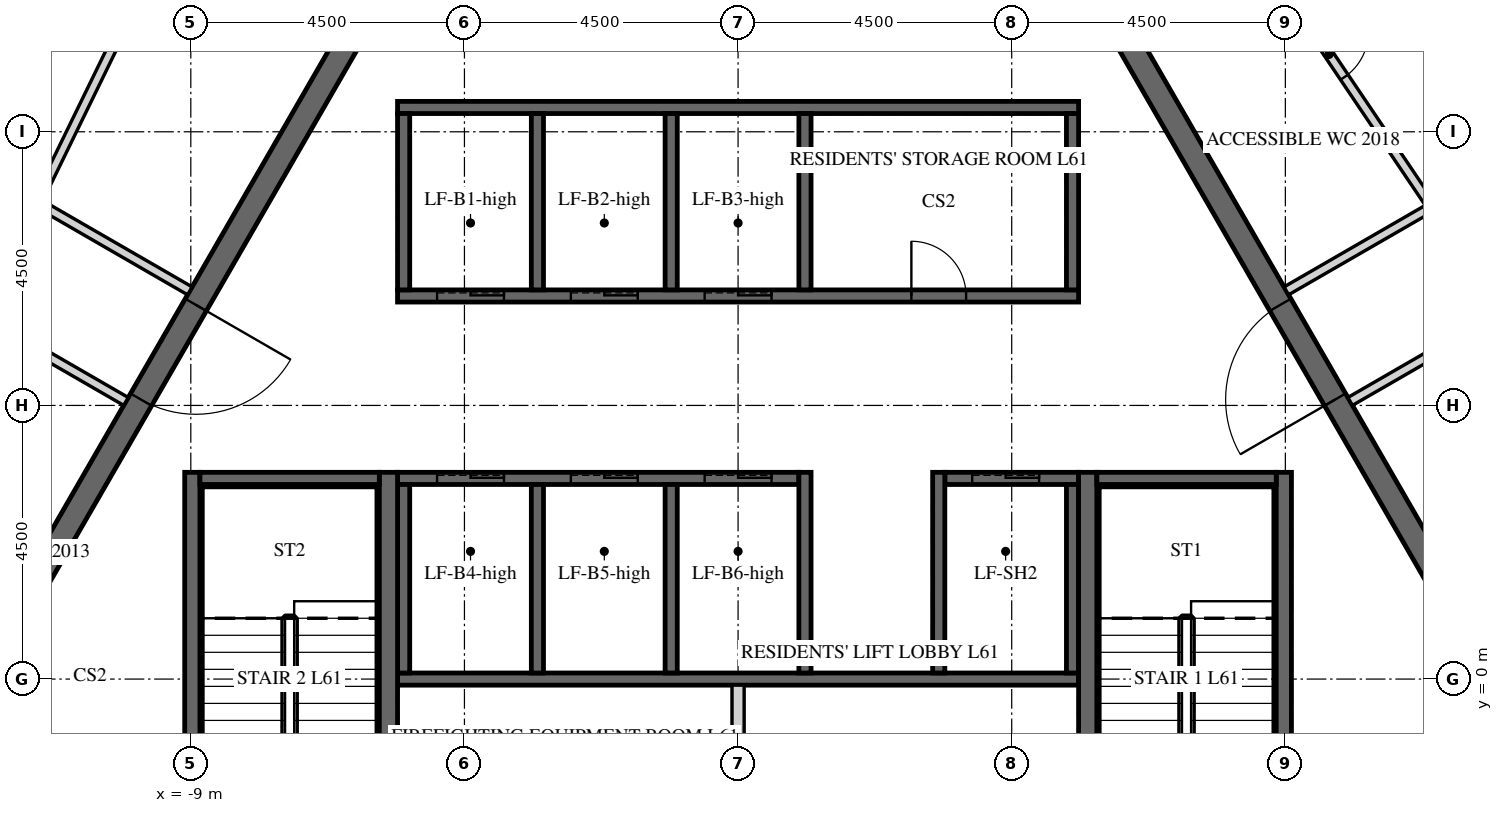
"""IFC4 building model, lengths in metres.
Left out: names, types, materials, properties, quantities, classifications, styles, units other than length and angle.
Written with IfcOpenShell. Run it as: python <this file> out.ifc"""

import sys

from ifc_helpers import new_model, si_unit, direction, frame, frame_2d, origin, place, context, subcontext, project, spatial, polyline, rectangle, outline, extrude, element, fill, save


model = new_model("IFC4")
c1 = context("Model", 3, precision=1e-05, world=origin(), true_north=direction((0.0, 1.0)))
c2 = subcontext(c1, "Body", "Model", "MODEL_VIEW")
j1 = project(units=[si_unit("LENGTHUNIT", "METRE"), si_unit("PLANEANGLEUNIT", "RADIAN")], contexts=[c1])
p1 = place(None, origin())
s1 = spatial("IfcSite", under=j1, at=p1, CompositionType="ELEMENT")
p2 = place(p1, origin())
s2 = spatial("IfcBuilding", under=s1, at=p2, CompositionType="ELEMENT")
p3 = place(p2, frame((0.0, 0.0, 256.2)))
s3 = spatial("IfcBuildingStorey", under=s2, at=p3, CompositionType="ELEMENT", Elevation=256.2)
p4 = place(p3, frame((-6.235, 10.8, 0.0), z_axis=(0.0, 0.0, 1.0), x_axis=(-0.499996419489, -0.866027470984, 0.0)))
e1 = element("IfcWall", 1, at=p4, inside=s3, PredefinedType="SHEAR", context=c2, shape_type="SweptSolid", body=[
    extrude(outline(polyline([(-0.115, -0.2), (12.586, -0.2), (12.355, 0.2), (0.115, 0.2), (-0.115, -0.2)])), origin(), (0.0, 0.0, 1.0), 3.75),
])
p5 = place(p4, frame((5.364, 0.0, 0.0)))
e2 = element("IfcOpeningElement", 2, at=p5, cuts=e1, PredefinedType="OPENING", context=c2, shape_type="SweptSolid", body=[
    extrude(rectangle(XDim=1.8, YDim=2.4, at=frame_2d((0.9, 1.2))), frame((0.0, 0.21, 0.0), z_axis=(0.0, -1.0, 0.0), x_axis=(1.0, 0.0, 0.0)), (0.0, 0.0, 1.0), 0.42),
])
p6 = place(p3, frame((-12.471, 0.0, 0.0), z_axis=(0.0, 0.0, 1.0), x_axis=(0.499996419489, -0.866027470984, 0.0)))
e3 = element("IfcWall", 3, at=p6, inside=s3, PredefinedType="SHEAR", context=c2, shape_type="SweptSolid", body=[
    extrude(outline(polyline([(-0.115, -0.2), (12.586, -0.2), (12.355, 0.2), (0.115, 0.2), (-0.115, -0.2)])), origin(), (0.0, 0.0, 1.0), 3.75),
])
p7 = place(p6, frame((5.306, 0.0, 0.0)))
e4 = element("IfcOpeningElement", 4, at=p7, cuts=e3, PredefinedType="OPENING", context=c2, shape_type="SweptSolid", body=[
    extrude(rectangle(XDim=1.8, YDim=2.4, at=frame_2d((0.9, 1.2))), frame((0.0, 0.21, 0.0), z_axis=(0.0, -1.0, 0.0), x_axis=(1.0, 0.0, 0.0)), (0.0, 0.0, 1.0), 0.42),
])
p8 = place(p3, frame((6.235, -10.8, 0.0), z_axis=(0.0, 0.0, 1.0), x_axis=(0.499996419489, 0.866027470984, 0.0)))
e5 = element("IfcWall", 5, at=p8, inside=s3, PredefinedType="SHEAR", context=c2, shape_type="SweptSolid", body=[
    extrude(outline(polyline([(-0.115, -0.2), (12.586, -0.2), (12.355, 0.2), (0.115, 0.2), (-0.115, -0.2)])), origin(), (0.0, 0.0, 1.0), 3.75),
])
p9 = place(p8, frame((5.364, 0.0, 0.0)))
e6 = element("IfcOpeningElement", 6, at=p9, cuts=e5, PredefinedType="OPENING", context=c2, shape_type="SweptSolid", body=[
    extrude(rectangle(XDim=1.8, YDim=2.4, at=frame_2d((0.9, 1.2))), frame((0.0, 0.21, 0.0), z_axis=(0.0, -1.0, 0.0), x_axis=(1.0, 0.0, 0.0)), (0.0, 0.0, 1.0), 0.42),
])
p10 = place(p3, frame((12.471, 0.0, 0.0), z_axis=(0.0, 0.0, 1.0), x_axis=(-0.499996419489, 0.866027470984, 0.0)))
e7 = element("IfcWall", 7, at=p10, inside=s3, PredefinedType="SHEAR", context=c2, shape_type="SweptSolid", body=[
    extrude(outline(polyline([(-0.115, -0.2), (12.586, -0.2), (12.355, 0.2), (0.115, 0.2), (-0.115, -0.2)])), origin(), (0.0, 0.0, 1.0), 3.75),
])
p11 = place(p10, frame((5.306, 0.0, 0.0)))
e8 = element("IfcOpeningElement", 8, at=p11, cuts=e7, PredefinedType="OPENING", context=c2, shape_type="SweptSolid", body=[
    extrude(rectangle(XDim=1.8, YDim=2.4, at=frame_2d((0.9, 1.2))), frame((0.0, 0.21, 0.0), z_axis=(0.0, -1.0, 0.0), x_axis=(1.0, 0.0, 0.0)), (0.0, 0.0, 1.0), 0.42),
])
p12 = place(p3, frame((-5.6, 6.3, -0.5), z_axis=(0.0, 0.0, 1.0), x_axis=(1.0, 0.0, 0.0)))
e9 = element("IfcWall", 9, at=p12, inside=s3, PredefinedType="SHEAR", context=c2, shape_type="SweptSolid", body=[
    extrude(rectangle(XDim=11.2, YDim=0.2, at=frame_2d((5.6, 0.0))), origin(), (0.0, 0.0, 1.0), 4.15),
])
p13 = place(p12, frame((8.45, 0.0, 0.5)))
e10 = element("IfcOpeningElement", 10, at=p13, cuts=e9, PredefinedType="OPENING", context=c2, shape_type="SweptSolid", body=[
    extrude(rectangle(XDim=0.9, YDim=2.1, at=frame_2d((0.45, 1.05))), frame((0.0, 0.11, 0.0), z_axis=(0.0, -1.0, 0.0), x_axis=(1.0, 0.0, 0.0)), (0.0, 0.0, 1.0), 0.22),
])
p14 = place(p12, frame((0.65, 0.0, 0.5)))
e11 = element("IfcOpeningElement", 11, at=p14, cuts=e9, PredefinedType="OPENING", context=c2, shape_type="SweptSolid", body=[
    extrude(rectangle(XDim=1.1, YDim=2.1, at=frame_2d((0.55, 1.05))), frame((0.0, 0.11, 0.0), z_axis=(0.0, -1.0, 0.0), x_axis=(1.0, 0.0, 0.0)), (0.0, 0.0, 1.0), 0.22),
])
p15 = place(p12, frame((2.85, 0.0, 0.5)))
e12 = element("IfcOpeningElement", 12, at=p15, cuts=e9, PredefinedType="OPENING", context=c2, shape_type="SweptSolid", body=[
    extrude(rectangle(XDim=1.1, YDim=2.1, at=frame_2d((0.55, 1.05))), frame((0.0, 0.11, 0.0), z_axis=(0.0, -1.0, 0.0), x_axis=(1.0, 0.0, 0.0)), (0.0, 0.0, 1.0), 0.22),
])
p16 = place(p12, frame((5.05, 0.0, 0.5)))
e13 = element("IfcOpeningElement", 13, at=p16, cuts=e9, PredefinedType="OPENING", context=c2, shape_type="SweptSolid", body=[
    extrude(rectangle(XDim=1.1, YDim=2.1, at=frame_2d((0.55, 1.05))), frame((0.0, 0.11, 0.0), z_axis=(0.0, -1.0, 0.0), x_axis=(1.0, 0.0, 0.0)), (0.0, 0.0, 1.0), 0.22),
])
p17 = place(p3, frame((-5.6, 9.4, -0.5), z_axis=(0.0, 0.0, 1.0), x_axis=(1.0, 0.0, 0.0)))
e14 = element("IfcWall", 14, at=p17, inside=s3, PredefinedType="SHEAR", context=c2, shape_type="SweptSolid", body=[
    extrude(rectangle(XDim=11.2, YDim=0.2, at=frame_2d((5.6, 0.0))), origin(), (0.0, 0.0, 1.0), 4.15),
])
for number, where, z_axis, x_axis in (
    (15, (-5.5, 6.4, -0.5), (0.0, 0.0, 1.0), (0.0, 1.0, 0.0)),
    (16, (-3.3, 6.4, -0.5), (0.0, 0.0, 1.0), (0.0, 1.0, 0.0)),
    (17, (-1.1, 6.4, -0.5), (0.0, 0.0, 1.0), (0.0, 1.0, 0.0)),
    (18, (1.1, 6.4, -0.5), (0.0, 0.0, 1.0), (0.0, 1.0, 0.0)),
    (19, (5.5, 6.4, -0.5), (0.0, 0.0, 1.0), (0.0, 1.0, 0.0)),
):
    element("IfcWall", number, at=place(p3, frame(where, z_axis=z_axis, x_axis=x_axis)), inside=s3, PredefinedType="SHEAR", context=c2, shape_type="SweptSolid", body=[
        extrude(rectangle(XDim=2.9, YDim=0.2, at=frame_2d((1.45, 0.0))), origin(), (0.0, 0.0, 1.0), 4.15),
    ])
p18 = place(p3, frame((-5.6, 3.3, -0.5), z_axis=(0.0, 0.0, 1.0), x_axis=(1.0, 0.0, 0.0)))
e20 = element("IfcWall", 20, at=p18, inside=s3, PredefinedType="SHEAR", context=c2, shape_type="SweptSolid", body=[
    extrude(rectangle(XDim=6.6, YDim=0.2, at=frame_2d((3.3, 0.0))), origin(), (0.0, 0.0, 1.0), 4.15),
])
p19 = place(p18, frame((0.65, 0.0, 0.5)))
e21 = element("IfcOpeningElement", 21, at=p19, cuts=e20, PredefinedType="OPENING", context=c2, shape_type="SweptSolid", body=[
    extrude(rectangle(XDim=1.1, YDim=2.1, at=frame_2d((0.55, 1.05))), frame((0.0, 0.11, 0.0), z_axis=(0.0, -1.0, 0.0), x_axis=(1.0, 0.0, 0.0)), (0.0, 0.0, 1.0), 0.22),
])
p20 = place(p18, frame((2.85, 0.0, 0.5)))
e22 = element("IfcOpeningElement", 22, at=p20, cuts=e20, PredefinedType="OPENING", context=c2, shape_type="SweptSolid", body=[
    extrude(rectangle(XDim=1.1, YDim=2.1, at=frame_2d((0.55, 1.05))), frame((0.0, 0.11, 0.0), z_axis=(0.0, -1.0, 0.0), x_axis=(1.0, 0.0, 0.0)), (0.0, 0.0, 1.0), 0.22),
])
p21 = place(p18, frame((5.05, 0.0, 0.5)))
e23 = element("IfcOpeningElement", 23, at=p21, cuts=e20, PredefinedType="OPENING", context=c2, shape_type="SweptSolid", body=[
    extrude(rectangle(XDim=1.1, YDim=2.1, at=frame_2d((0.55, 1.05))), frame((0.0, 0.11, 0.0), z_axis=(0.0, -1.0, 0.0), x_axis=(1.0, 0.0, 0.0)), (0.0, 0.0, 1.0), 0.22),
])
p22 = place(p3, frame((3.4, 3.3, -0.5), z_axis=(0.0, 0.0, 1.0), x_axis=(1.0, 0.0, 0.0)))
e24 = element("IfcWall", 24, at=p22, inside=s3, PredefinedType="SHEAR", context=c2, shape_type="SweptSolid", body=[
    extrude(rectangle(XDim=2.2, YDim=0.2, at=frame_2d((1.1, 0.0))), origin(), (0.0, 0.0, 1.0), 4.15),
])
p23 = place(p22, frame((0.45, 0.0, 0.5)))
e25 = element("IfcOpeningElement", 25, at=p23, cuts=e24, PredefinedType="OPENING", context=c2, shape_type="SweptSolid", body=[
    extrude(rectangle(XDim=1.1, YDim=2.1, at=frame_2d((0.55, 1.05))), frame((0.0, 0.11, 0.0), z_axis=(0.0, -1.0, 0.0), x_axis=(1.0, 0.0, 0.0)), (0.0, 0.0, 1.0), 0.22),
])
p24 = place(p3, frame((-5.6, 0.0, -0.5), z_axis=(0.0, 0.0, 1.0), x_axis=(1.0, 0.0, 0.0)))
e26 = element("IfcWall", 26, at=p24, inside=s3, PredefinedType="SHEAR", context=c2, shape_type="SweptSolid", body=[
    extrude(rectangle(XDim=11.2, YDim=0.2, at=frame_2d((5.6, 0.0))), origin(), (0.0, 0.0, 1.0), 4.15),
])
for number, where, z_axis, x_axis in (
    (27, (-5.5, 0.1, -0.5), (0.0, 0.0, 1.0), (0.0, 1.0, 0.0)),
    (28, (-3.3, 0.1, -0.5), (0.0, 0.0, 1.0), (0.0, 1.0, 0.0)),
    (29, (-1.1, 0.1, -0.5), (0.0, 0.0, 1.0), (0.0, 1.0, 0.0)),
):
    element("IfcWall", number, at=place(p3, frame(where, z_axis=z_axis, x_axis=x_axis)), inside=s3, PredefinedType="SHEAR", context=c2, shape_type="SweptSolid", body=[
        extrude(rectangle(XDim=3.1, YDim=0.2, at=frame_2d((1.55, 0.0))), origin(), (0.0, 0.0, 1.0), 4.15),
    ])
for number, where, z_axis, x_axis in (
    (30, (1.1, 0.1, -0.5), (0.0, 0.0, 1.0), (0.0, 1.0, 0.0)),
    (31, (3.3, 0.1, -0.5), (0.0, 0.0, 1.0), (0.0, 1.0, 0.0)),
):
    element("IfcWall", number, at=place(p3, frame(where, z_axis=z_axis, x_axis=x_axis)), inside=s3, PredefinedType="SHEAR", context=c2, shape_type="SweptSolid", body=[
        extrude(rectangle(XDim=3.3, YDim=0.2, at=frame_2d((1.65, 0.0))), origin(), (0.0, 0.0, 1.0), 4.15),
    ])
p25 = place(p3, frame((5.5, 0.1, -0.5), z_axis=(0.0, 0.0, 1.0), x_axis=(0.0, 1.0, 0.0)))
e32 = element("IfcWall", 32, at=p25, inside=s3, PredefinedType="SHEAR", context=c2, shape_type="SweptSolid", body=[
    extrude(rectangle(XDim=3.1, YDim=0.2, at=frame_2d((1.55, 0.0))), origin(), (0.0, 0.0, 1.0), 4.15),
])
p26 = place(p3, frame((0.0, -6.2, 0.0), z_axis=(0.0, 0.0, 1.0), x_axis=(0.0, 1.0, 0.0)))
e33 = element("IfcWall", 33, at=p26, inside=s3, PredefinedType="PARTITIONING", context=c2, shape_type="SweptSolid", body=[
    extrude(rectangle(XDim=6.1, YDim=0.2, at=frame_2d((3.05, 0.0))), origin(), (0.0, 0.0, 1.0), 3.65),
])
p27 = place(p3, frame((5.75, -3.4, -0.5), z_axis=(0.0, 0.0, 1.0), x_axis=(0.0, 1.0, 0.0)))
e34 = element("IfcWall", 34, at=p27, inside=s3, PredefinedType="SHEAR", context=c2, shape_type="SweptSolid", body=[
    extrude(rectangle(XDim=6.8, YDim=0.3, at=frame_2d((3.4, 0.0))), origin(), (0.0, 0.0, 1.0), 4.15),
])
p28 = place(p3, frame((8.975, -3.4, -0.5), z_axis=(0.0, 0.0, 1.0), x_axis=(0.0, 1.0, 0.0)))
e35 = element("IfcWall", 35, at=p28, inside=s3, PredefinedType="SHEAR", context=c2, shape_type="SweptSolid", body=[
    extrude(rectangle(XDim=6.8, YDim=0.25, at=frame_2d((3.4, 0.0))), origin(), (0.0, 0.0, 1.0), 4.15),
])
p29 = place(p3, frame((5.9, 3.3, -0.5), z_axis=(0.0, 0.0, 1.0), x_axis=(1.0, 0.0, 0.0)))
e36 = element("IfcWall", 36, at=p29, inside=s3, PredefinedType="SHEAR", context=c2, shape_type="SweptSolid", body=[
    extrude(rectangle(XDim=2.95, YDim=0.2, at=frame_2d((1.475, 0.0))), origin(), (0.0, 0.0, 1.0), 4.15),
])
p30 = place(p3, frame((-5.75, -3.4, -0.5), z_axis=(0.0, 0.0, 1.0), x_axis=(0.0, 1.0, 0.0)))
e37 = element("IfcWall", 37, at=p30, inside=s3, PredefinedType="SHEAR", context=c2, shape_type="SweptSolid", body=[
    extrude(rectangle(XDim=6.8, YDim=0.3, at=frame_2d((3.4, 0.0))), origin(), (0.0, 0.0, 1.0), 4.15),
])
p31 = place(p3, frame((-8.975, -3.4, -0.5), z_axis=(0.0, 0.0, 1.0), x_axis=(0.0, 1.0, 0.0)))
e38 = element("IfcWall", 38, at=p31, inside=s3, PredefinedType="SHEAR", context=c2, shape_type="SweptSolid", body=[
    extrude(rectangle(XDim=6.8, YDim=0.25, at=frame_2d((3.4, 0.0))), origin(), (0.0, 0.0, 1.0), 4.15),
])
p32 = place(p3, frame((-8.85, 3.3, -0.5), z_axis=(0.0, 0.0, 1.0), x_axis=(1.0, 0.0, 0.0)))
e39 = element("IfcWall", 39, at=p32, inside=s3, PredefinedType="SHEAR", context=c2, shape_type="SweptSolid", body=[
    extrude(rectangle(XDim=2.95, YDim=0.2, at=frame_2d((1.475, 0.0))), origin(), (0.0, 0.0, 1.0), 4.15),
])
p33 = place(p3, frame((-8.622, 17.225, 0.0), z_axis=(0.0, 0.0, 1.0), x_axis=(-0.438366544921, -0.898796290765, 0.0)))
e40 = element("IfcWall", 40, at=p33, inside=s3, PredefinedType="PARTITIONING", context=c2, shape_type="SweptSolid", body=[
    extrude(rectangle(XDim=17.273, YDim=0.15, at=frame_2d((8.637, 0.0))), origin(), (0.0, 0.0, 1.0), 2.823),
])
p34 = place(p33, frame((6.478, 0.0, 0.0)))
e41 = element("IfcOpeningElement", 41, at=p34, cuts=e40, PredefinedType="OPENING", context=c2, shape_type="SweptSolid", body=[
    extrude(rectangle(XDim=1.0, YDim=2.1, at=frame_2d((0.5, 1.05))), frame((0.0, 0.085, 0.0), z_axis=(0.0, -1.0, 0.0), x_axis=(1.0, 0.0, 0.0)), (0.0, 0.0, 1.0), 0.17),
])
p35 = place(p3, frame((-9.016, 6.384, 0.0), z_axis=(0.0, 0.0, 1.0), x_axis=(-0.866010648346, 0.500025556299, 0.0)))
e42 = element("IfcWall", 42, at=p35, inside=s3, PredefinedType="PARTITIONING", context=c2, shape_type="SweptSolid", body=[
    extrude(rectangle(XDim=2.905, YDim=0.15, at=frame_2d((1.453, 0.0))), origin(), (0.0, 0.0, 1.0), 2.823),
])
p36 = place(p3, frame((-11.499, 7.905, 0.0), z_axis=(0.0, 0.0, 1.0), x_axis=(0.438365041944, 0.898797023805, 0.0)))
e43 = element("IfcWall", 43, at=p36, inside=s3, PredefinedType="PARTITIONING", context=c2, shape_type="SweptSolid", body=[
    extrude(rectangle(XDim=8.784, YDim=0.15, at=frame_2d((4.392, 0.0))), origin(), (0.0, 0.0, 1.0), 2.823),
])
p37 = place(p3, frame((-12.389, 5.907, 0.0), z_axis=(0.0, 0.0, 1.0), x_axis=(0.866034066097, -0.499984996134, 0.0)))
e44 = element("IfcWall", 44, at=p37, inside=s3, PredefinedType="PARTITIONING", context=c2, shape_type="SweptSolid", body=[
    extrude(rectangle(XDim=2.683, YDim=0.15, at=frame_2d((1.342, 0.0))), origin(), (0.0, 0.0, 1.0), 2.823),
])
p38 = place(p3, frame((19.228, -1.146, 0.0), z_axis=(0.0, 0.0, 1.0), x_axis=(-0.559190017735, 0.829039519001, 0.0)))
e45 = element("IfcWall", 45, at=p38, inside=s3, PredefinedType="PARTITIONING", context=c2, shape_type="SweptSolid", body=[
    extrude(rectangle(XDim=17.273, YDim=0.15, at=frame_2d((8.637, 0.0))), origin(), (0.0, 0.0, 1.0), 2.823),
])
p39 = place(p38, frame((6.478, 0.0, 0.0)))
e46 = element("IfcOpeningElement", 46, at=p39, cuts=e45, PredefinedType="OPENING", context=c2, shape_type="SweptSolid", body=[
    extrude(rectangle(XDim=1.0, YDim=2.1, at=frame_2d((0.5, 1.05))), frame((0.0, 0.085, 0.0), z_axis=(0.0, -1.0, 0.0), x_axis=(1.0, 0.0, 0.0)), (0.0, 0.0, 1.0), 0.17),
])
p40 = place(p3, frame((10.066, 4.566, 0.0), z_axis=(0.0, 0.0, 1.0), x_axis=(0.866034661658, 0.49998396455, 0.0)))
e47 = element("IfcWall", 47, at=p40, inside=s3, PredefinedType="PARTITIONING", context=c2, shape_type="SweptSolid", body=[
    extrude(rectangle(XDim=2.909, YDim=0.15, at=frame_2d((1.455, 0.0))), origin(), (0.0, 0.0, 1.0), 2.823),
])
p41 = place(p3, frame((8.028, 12.777, 0.0), z_axis=(0.0, 0.0, 1.0), x_axis=(0.559175239609, -0.829049486707, 0.0)))
e48 = element("IfcWall", 48, at=p41, inside=s3, PredefinedType="PARTITIONING", context=c2, shape_type="SweptSolid", body=[
    extrude(rectangle(XDim=6.045, YDim=0.15, at=frame_2d((3.022, 0.0))), origin(), (0.0, 0.0, 1.0), 2.823),
])
p42 = place(p41, frame((2.572, 0.0, 0.0)))
e49 = element("IfcOpeningElement", 49, at=p42, cuts=e48, PredefinedType="OPENING", context=c2, shape_type="SweptSolid", body=[
    extrude(rectangle(XDim=0.9, YDim=2.1, at=frame_2d((0.45, 1.05))), frame((0.0, 0.085, 0.0), z_axis=(0.0, -1.0, 0.0), x_axis=(1.0, 0.0, 0.0)), (0.0, 0.0, 1.0), 0.17),
])
p43 = place(p3, frame((11.343, 7.728, 0.0), z_axis=(0.0, 0.0, 1.0), x_axis=(-0.866037314867, -0.499979368833, 0.0)))
e50 = element("IfcWall", 50, at=p43, inside=s3, PredefinedType="PARTITIONING", context=c2, shape_type="SweptSolid", body=[
    extrude(rectangle(XDim=2.687, YDim=0.15, at=frame_2d((1.344, 0.0))), origin(), (0.0, 0.0, 1.0), 2.823),
])
p44 = place(p5, origin())
e51 = element("IfcDoor", 51, at=p44, inside=s3, OperationType="DOUBLE_DOOR_SINGLE_SWING", PredefinedType="DOOR", context=c2, shape_type="SweptSolid", body=[
    extrude(rectangle(XDim=1.8, YDim=2.4, at=frame_2d((0.9, 1.2))), frame((0.0, 0.025, 0.0), z_axis=(0.0, -1.0, 0.0), x_axis=(1.0, 0.0, 0.0)), (0.0, 0.0, 1.0), 0.05),
])
fill(e2, e51)
p45 = place(p11, origin())
e52 = element("IfcDoor", 52, at=p45, inside=s3, OperationType="DOUBLE_DOOR_SINGLE_SWING", PredefinedType="DOOR", context=c2, shape_type="SweptSolid", body=[
    extrude(rectangle(XDim=1.8, YDim=2.4, at=frame_2d((0.9, 1.2))), frame((0.0, 0.025, 0.0), z_axis=(0.0, -1.0, 0.0), x_axis=(1.0, 0.0, 0.0)), (0.0, 0.0, 1.0), 0.05),
])
fill(e8, e52)
p46 = place(p13, origin())
e53 = element("IfcDoor", 53, at=p46, inside=s3, OperationType="SINGLE_SWING_LEFT", PredefinedType="DOOR", context=c2, shape_type="SweptSolid", body=[
    extrude(rectangle(XDim=0.9, YDim=2.1, at=frame_2d((0.45, 1.05))), frame((0.0, 0.025, 0.0), z_axis=(0.0, -1.0, 0.0), x_axis=(1.0, 0.0, 0.0)), (0.0, 0.0, 1.0), 0.05),
])
fill(e10, e53)
p47 = place(p14, origin())
e54 = element("IfcDoor", 54, at=p47, inside=s3, OperationType="SLIDING_TO_LEFT", PredefinedType="DOOR", context=c2, shape_type="SweptSolid", body=[
    extrude(rectangle(XDim=1.1, YDim=2.1, at=frame_2d((0.55, 1.05))), frame((0.0, 0.025, 0.0), z_axis=(0.0, -1.0, 0.0), x_axis=(1.0, 0.0, 0.0)), (0.0, 0.0, 1.0), 0.05),
])
fill(e11, e54)
p48 = place(p15, origin())
e55 = element("IfcDoor", 55, at=p48, inside=s3, OperationType="SLIDING_TO_LEFT", PredefinedType="DOOR", context=c2, shape_type="SweptSolid", body=[
    extrude(rectangle(XDim=1.1, YDim=2.1, at=frame_2d((0.55, 1.05))), frame((0.0, 0.025, 0.0), z_axis=(0.0, -1.0, 0.0), x_axis=(1.0, 0.0, 0.0)), (0.0, 0.0, 1.0), 0.05),
])
fill(e12, e55)
p49 = place(p16, origin())
e56 = element("IfcDoor", 56, at=p49, inside=s3, OperationType="SLIDING_TO_LEFT", PredefinedType="DOOR", context=c2, shape_type="SweptSolid", body=[
    extrude(rectangle(XDim=1.1, YDim=2.1, at=frame_2d((0.55, 1.05))), frame((0.0, 0.025, 0.0), z_axis=(0.0, -1.0, 0.0), x_axis=(1.0, 0.0, 0.0)), (0.0, 0.0, 1.0), 0.05),
])
fill(e13, e56)
p50 = place(p19, origin())
e57 = element("IfcDoor", 57, at=p50, inside=s3, OperationType="SLIDING_TO_LEFT", PredefinedType="DOOR", context=c2, shape_type="SweptSolid", body=[
    extrude(rectangle(XDim=1.1, YDim=2.1, at=frame_2d((0.55, 1.05))), frame((0.0, 0.025, 0.0), z_axis=(0.0, -1.0, 0.0), x_axis=(1.0, 0.0, 0.0)), (0.0, 0.0, 1.0), 0.05),
])
fill(e21, e57)
p51 = place(p20, origin())
e58 = element("IfcDoor", 58, at=p51, inside=s3, OperationType="SLIDING_TO_LEFT", PredefinedType="DOOR", context=c2, shape_type="SweptSolid", body=[
    extrude(rectangle(XDim=1.1, YDim=2.1, at=frame_2d((0.55, 1.05))), frame((0.0, 0.025, 0.0), z_axis=(0.0, -1.0, 0.0), x_axis=(1.0, 0.0, 0.0)), (0.0, 0.0, 1.0), 0.05),
])
fill(e22, e58)
p52 = place(p21, origin())
e59 = element("IfcDoor", 59, at=p52, inside=s3, OperationType="SLIDING_TO_LEFT", PredefinedType="DOOR", context=c2, shape_type="SweptSolid", body=[
    extrude(rectangle(XDim=1.1, YDim=2.1, at=frame_2d((0.55, 1.05))), frame((0.0, 0.025, 0.0), z_axis=(0.0, -1.0, 0.0), x_axis=(1.0, 0.0, 0.0)), (0.0, 0.0, 1.0), 0.05),
])
fill(e23, e59)
p53 = place(p23, origin())
e60 = element("IfcDoor", 60, at=p53, inside=s3, OperationType="SLIDING_TO_LEFT", PredefinedType="DOOR", context=c2, shape_type="SweptSolid", body=[
    extrude(rectangle(XDim=1.1, YDim=2.1, at=frame_2d((0.55, 1.05))), frame((0.0, 0.025, 0.0), z_axis=(0.0, -1.0, 0.0), x_axis=(1.0, 0.0, 0.0)), (0.0, 0.0, 1.0), 0.05),
])
fill(e25, e60)
p54 = place(p42, origin())
e61 = element("IfcDoor", 61, at=p54, inside=s3, OperationType="SINGLE_SWING_RIGHT", PredefinedType="DOOR", context=c2, shape_type="SweptSolid", body=[
    extrude(rectangle(XDim=0.9, YDim=2.1, at=frame_2d((0.45, 1.05))), frame((0.0, 0.025, 0.0), z_axis=(0.0, -1.0, 0.0), x_axis=(1.0, 0.0, 0.0)), (0.0, 0.0, 1.0), 0.05),
])
fill(e49, e61)
save(model, sys.argv[1])
